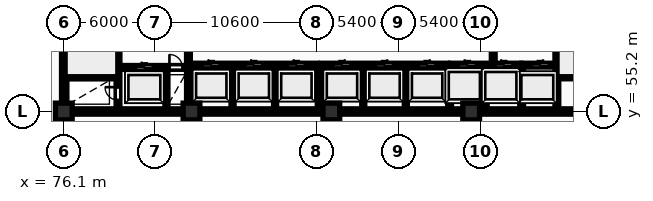
"""IFC4 building model, lengths in metres.
Left out: names, types, materials, properties, quantities, classifications, styles, units other than length and angle.
Written with IfcOpenShell. Run it as: python <this file> out.ifc"""

import sys

from ifc_helpers import new_model, si_unit, direction, frame, frame_2d, origin, origin_2d, place, context, subcontext, project, spatial, rectangle, extrude, element, fill, save


model = new_model("IFC4")
c1 = context("Model", 3, precision=1e-05, world=origin(), true_north=direction((0.0, 1.0)))
c2 = subcontext(c1, "Body", "Model", "MODEL_VIEW")
j1 = project(units=[si_unit("LENGTHUNIT", "METRE"), si_unit("PLANEANGLEUNIT", "RADIAN")], contexts=[c1])
p1 = place(None, origin())
s1 = spatial("IfcSite", under=j1, at=p1, CompositionType="ELEMENT")
p2 = place(p1, origin())
s2 = spatial("IfcBuilding", under=s1, at=p2, CompositionType="ELEMENT")
p3 = place(p2, origin())
s3 = spatial("IfcBuildingStorey", under=s2, at=p3, CompositionType="ELEMENT", Elevation=0.0)
for number, where, z_axis, x_axis in (
    (1, (76.1, 55.2, 0.0), (0.0, 0.0, 1.0), (1.0, 0.0, 0.0)),
    (2, (84.5, 55.2, 0.0), (0.0, 0.0, 1.0), (1.0, 0.0, 0.0)),
    (3, (93.7, 55.2, 0.0), (0.0, 0.0, 1.0), (1.0, 0.0, 0.0)),
    (4, (102.9, 55.2, 0.0), (0.0, 0.0, 1.0), (1.0, 0.0, 0.0)),
):
    element("IfcColumn", number, at=place(p3, frame(where, z_axis=z_axis, x_axis=x_axis)), inside=s3, PredefinedType="COLUMN", context=c2, shape_type="SweptSolid", body=[
        extrude(rectangle(XDim=1.1, YDim=1.1, at=origin_2d()), origin(), (0.0, 0.0, 1.0), 5.4),
    ])
p4 = place(p3, frame((75.95, 55.2, 0.0), z_axis=(0.0, 0.0, 1.0), x_axis=(1.0, 0.0, 0.0)))
e5 = element("IfcWall", 5, at=p4, inside=s3, PredefinedType="SHEAR", context=c2, shape_type="SweptSolid", body=[
    extrude(rectangle(XDim=36.3, YDim=0.35, at=frame_2d((18.15, 0.0))), origin(), (0.0, 0.0, 1.0), 5.4),
])
p5 = place(p3, frame((76.125, 55.375, 0.0), z_axis=(0.0, 0.0, 1.0), x_axis=(0.0, 1.0, 0.0)))
e6 = element("IfcWall", 6, at=p5, inside=s3, PredefinedType="SHEAR", context=c2, shape_type="SweptSolid", body=[
    extrude(rectangle(XDim=11.65, YDim=0.35, at=frame_2d((5.825, 0.0))), origin(), (0.0, 0.0, 1.0), 5.4),
])
p6 = place(p3, frame((79.665, 55.4, 0.0), z_axis=(0.0, 0.0, 1.0), x_axis=(0.0, 1.0, 0.0)))
e7 = element("IfcWall", 7, at=p6, inside=s3, PredefinedType="SHEAR", context=c2, shape_type="SweptSolid", body=[
    extrude(rectangle(XDim=11.6, YDim=0.25, at=frame_2d((5.8, 0.0))), origin(), (0.0, 0.0, 1.0), 5.4),
])
p7 = place(p6, frame((0.55, 0.0, 0.0)))
e8 = element("IfcOpeningElement", 8, at=p7, cuts=e7, PredefinedType="OPENING", context=c2, shape_type="SweptSolid", body=[
    extrude(rectangle(XDim=0.85, YDim=2.05, at=frame_2d((0.425, 1.025))), frame((0.0, 0.135, 0.0), z_axis=(0.0, -1.0, 0.0), x_axis=(1.0, 0.0, 0.0)), (0.0, 0.0, 1.0), 0.27),
])
p8 = place(p6, frame((8.4, 0.0, 0.0)))
e9 = element("IfcOpeningElement", 9, at=p8, cuts=e7, PredefinedType="OPENING", context=c2, shape_type="SweptSolid", body=[
    extrude(rectangle(XDim=1.1, YDim=2.1, at=frame_2d((0.55, 1.05))), frame((0.0, 0.135, 0.0), z_axis=(0.0, -1.0, 0.0), x_axis=(1.0, 0.0, 0.0)), (0.0, 0.0, 1.0), 0.27),
])
p9 = place(p6, frame((10.25, 0.0, 0.0)))
e10 = element("IfcOpeningElement", 10, at=p9, cuts=e7, PredefinedType="OPENING", context=c2, shape_type="SweptSolid", body=[
    extrude(rectangle(XDim=0.85, YDim=2.05, at=frame_2d((0.425, 1.025))), frame((0.0, 0.135, 0.0), z_axis=(0.0, -1.0, 0.0), x_axis=(1.0, 0.0, 0.0)), (0.0, 0.0, 1.0), 0.27),
])
p10 = place(p3, frame((76.3, 57.475, 0.0), z_axis=(0.0, 0.0, 1.0), x_axis=(1.0, 0.0, 0.0)))
e11 = element("IfcWall", 11, at=p10, inside=s3, PredefinedType="SHEAR", context=c2, shape_type="SweptSolid", body=[
    extrude(rectangle(XDim=3.24, YDim=0.25, at=frame_2d((1.62, 0.0))), origin(), (0.0, 0.0, 1.0), 5.4),
])
p11 = place(p3, frame((79.79, 58.1, 0.0), z_axis=(0.0, 0.0, 1.0), x_axis=(1.0, 0.0, 0.0)))
e12 = element("IfcWall", 12, at=p11, inside=s3, PredefinedType="SHEAR", context=c2, shape_type="SweptSolid", body=[
    extrude(rectangle(XDim=4.39, YDim=0.25, at=frame_2d((2.195, 0.0))), origin(), (0.0, 0.0, 1.0), 5.4),
])
p12 = place(p11, frame((1.05, 0.0, 0.0)))
e13 = element("IfcOpeningElement", 13, at=p12, cuts=e12, PredefinedType="OPENING", context=c2, shape_type="SweptSolid", body=[
    extrude(rectangle(XDim=1.12, YDim=2.12, at=frame_2d((0.56, 1.06))), frame((0.0, 0.135, 0.0), z_axis=(0.0, -1.0, 0.0), x_axis=(1.0, 0.0, 0.0)), (0.0, 0.0, 1.0), 0.27),
])
p13 = place(p11, frame((3.26, 0.0, 0.0)))
e14 = element("IfcOpeningElement", 14, at=p13, cuts=e12, PredefinedType="OPENING", context=c2, shape_type="SweptSolid", body=[
    extrude(rectangle(XDim=0.85, YDim=2.05, at=frame_2d((0.425, 1.025))), frame((0.0, 0.135, 0.0), z_axis=(0.0, -1.0, 0.0), x_axis=(1.0, 0.0, 0.0)), (0.0, 0.0, 1.0), 0.27),
])
p14 = place(p3, frame((82.85, 55.4, 0.0), z_axis=(0.0, 0.0, 1.0), x_axis=(0.0, 1.0, 0.0)))
e15 = element("IfcWall", 15, at=p14, inside=s3, PredefinedType="PARTITIONING", context=c2, shape_type="SweptSolid", body=[
    extrude(rectangle(XDim=2.56, YDim=0.2, at=frame_2d((1.28, 0.0))), origin(), (0.0, 0.0, 1.0), 5.1),
])
p15 = place(p3, frame((84.3, 55.4, 0.0), z_axis=(0.0, 0.0, 1.0), x_axis=(0.0, 1.0, 0.0)))
e16 = element("IfcWall", 16, at=p15, inside=s3, PredefinedType="SHEAR", context=c2, shape_type="SweptSolid", body=[
    extrude(rectangle(XDim=11.6, YDim=0.25, at=frame_2d((5.8, 0.0))), origin(), (0.0, 0.0, 1.0), 5.4),
])
p16 = place(p15, frame((5.2, 0.0, 0.0)))
e17 = element("IfcOpeningElement", 17, at=p16, cuts=e16, PredefinedType="OPENING", context=c2, shape_type="SweptSolid", body=[
    extrude(rectangle(XDim=1.1, YDim=2.1, at=frame_2d((0.55, 1.05))), frame((0.0, 0.135, 0.0), z_axis=(0.0, -1.0, 0.0), x_axis=(1.0, 0.0, 0.0)), (0.0, 0.0, 1.0), 0.27),
])
for number, where, z_axis, x_axis in (
    (18, (87.2, 55.4, 0.0), (0.0, 0.0, 1.0), (0.0, 1.0, 0.0)),
    (19, (90.0, 55.4, 0.0), (0.0, 0.0, 1.0), (0.0, 1.0, 0.0)),
):
    element("IfcWall", number, at=place(p3, frame(where, z_axis=z_axis, x_axis=x_axis)), inside=s3, PredefinedType="PARTITIONING", context=c2, shape_type="SweptSolid", body=[
        extrude(rectangle(XDim=2.72, YDim=0.2, at=frame_2d((1.36, 0.0))), origin(), (0.0, 0.0, 1.0), 5.1),
    ])
p17 = place(p3, frame((84.42, 58.25, 0.0), z_axis=(0.0, 0.0, 1.0), x_axis=(1.0, 0.0, 0.0)))
e20 = element("IfcWall", 20, at=p17, inside=s3, PredefinedType="SHEAR", context=c2, shape_type="SweptSolid", body=[
    extrude(rectangle(XDim=8.36, YDim=0.25, at=frame_2d((4.18, 0.0))), origin(), (0.0, 0.0, 1.0), 5.4),
])
p18 = place(p17, frame((0.82, 0.0, 0.0)))
e21 = element("IfcOpeningElement", 21, at=p18, cuts=e20, PredefinedType="OPENING", context=c2, shape_type="SweptSolid", body=[
    extrude(rectangle(XDim=1.12, YDim=2.12, at=frame_2d((0.56, 1.06))), frame((0.0, 0.135, 0.0), z_axis=(0.0, -1.0, 0.0), x_axis=(1.0, 0.0, 0.0)), (0.0, 0.0, 1.0), 0.27),
])
p19 = place(p17, frame((3.62, 0.0, 0.0)))
e22 = element("IfcOpeningElement", 22, at=p19, cuts=e20, PredefinedType="OPENING", context=c2, shape_type="SweptSolid", body=[
    extrude(rectangle(XDim=1.12, YDim=2.12, at=frame_2d((0.56, 1.06))), frame((0.0, 0.135, 0.0), z_axis=(0.0, -1.0, 0.0), x_axis=(1.0, 0.0, 0.0)), (0.0, 0.0, 1.0), 0.27),
])
p20 = place(p17, frame((6.42, 0.0, 0.0)))
e23 = element("IfcOpeningElement", 23, at=p20, cuts=e20, PredefinedType="OPENING", context=c2, shape_type="SweptSolid", body=[
    extrude(rectangle(XDim=1.12, YDim=2.12, at=frame_2d((0.56, 1.06))), frame((0.0, 0.135, 0.0), z_axis=(0.0, -1.0, 0.0), x_axis=(1.0, 0.0, 0.0)), (0.0, 0.0, 1.0), 0.27),
])
p21 = place(p3, frame((92.9, 55.4, 0.0), z_axis=(0.0, 0.0, 1.0), x_axis=(0.0, 1.0, 0.0)))
e24 = element("IfcWall", 24, at=p21, inside=s3, PredefinedType="SHEAR", context=c2, shape_type="SweptSolid", body=[
    extrude(rectangle(XDim=2.85, YDim=0.25, at=frame_2d((1.425, 0.0))), origin(), (0.0, 0.0, 1.0), 5.4),
])
for number, where, z_axis, x_axis in (
    (25, (95.8, 55.4, 0.0), (0.0, 0.0, 1.0), (0.0, 1.0, 0.0)),
    (26, (98.6, 55.4, 0.0), (0.0, 0.0, 1.0), (0.0, 1.0, 0.0)),
):
    element("IfcWall", number, at=place(p3, frame(where, z_axis=z_axis, x_axis=x_axis)), inside=s3, PredefinedType="PARTITIONING", context=c2, shape_type="SweptSolid", body=[
        extrude(rectangle(XDim=2.72, YDim=0.2, at=frame_2d((1.36, 0.0))), origin(), (0.0, 0.0, 1.0), 5.1),
    ])
p22 = place(p3, frame((93.02, 58.25, 0.0), z_axis=(0.0, 0.0, 1.0), x_axis=(1.0, 0.0, 0.0)))
e27 = element("IfcWall", 27, at=p22, inside=s3, PredefinedType="SHEAR", context=c2, shape_type="SweptSolid", body=[
    extrude(rectangle(XDim=8.36, YDim=0.25, at=frame_2d((4.18, 0.0))), origin(), (0.0, 0.0, 1.0), 5.4),
])
p23 = place(p22, frame((0.82, 0.0, 0.0)))
e28 = element("IfcOpeningElement", 28, at=p23, cuts=e27, PredefinedType="OPENING", context=c2, shape_type="SweptSolid", body=[
    extrude(rectangle(XDim=1.12, YDim=2.12, at=frame_2d((0.56, 1.06))), frame((0.0, 0.135, 0.0), z_axis=(0.0, -1.0, 0.0), x_axis=(1.0, 0.0, 0.0)), (0.0, 0.0, 1.0), 0.27),
])
p24 = place(p22, frame((3.62, 0.0, 0.0)))
e29 = element("IfcOpeningElement", 29, at=p24, cuts=e27, PredefinedType="OPENING", context=c2, shape_type="SweptSolid", body=[
    extrude(rectangle(XDim=1.12, YDim=2.12, at=frame_2d((0.56, 1.06))), frame((0.0, 0.135, 0.0), z_axis=(0.0, -1.0, 0.0), x_axis=(1.0, 0.0, 0.0)), (0.0, 0.0, 1.0), 0.27),
])
p25 = place(p22, frame((6.42, 0.0, 0.0)))
e30 = element("IfcOpeningElement", 30, at=p25, cuts=e27, PredefinedType="OPENING", context=c2, shape_type="SweptSolid", body=[
    extrude(rectangle(XDim=1.12, YDim=2.12, at=frame_2d((0.56, 1.06))), frame((0.0, 0.135, 0.0), z_axis=(0.0, -1.0, 0.0), x_axis=(1.0, 0.0, 0.0)), (0.0, 0.0, 1.0), 0.27),
])
p26 = place(p3, frame((101.48, 55.4, 0.0), z_axis=(0.0, 0.0, 1.0), x_axis=(0.0, 1.0, 0.0)))
e31 = element("IfcWall", 31, at=p26, inside=s3, PredefinedType="SHEAR", context=c2, shape_type="SweptSolid", body=[
    extrude(rectangle(XDim=2.85, YDim=0.25, at=frame_2d((1.425, 0.0))), origin(), (0.0, 0.0, 1.0), 5.4),
])
p27 = place(p3, frame((103.85, 55.4, 0.0), z_axis=(0.0, 0.0, 1.0), x_axis=(0.0, 1.0, 0.0)))
e32 = element("IfcWall", 32, at=p27, inside=s3, PredefinedType="PARTITIONING", context=c2, shape_type="SweptSolid", body=[
    extrude(rectangle(XDim=2.72, YDim=0.2, at=frame_2d((1.36, 0.0))), origin(), (0.0, 0.0, 1.0), 5.1),
])
p28 = place(p3, frame((101.55, 58.25, 0.0), z_axis=(0.0, 0.0, 1.0), x_axis=(1.0, 0.0, 0.0)))
e33 = element("IfcWall", 33, at=p28, inside=s3, PredefinedType="SHEAR", context=c2, shape_type="SweptSolid", body=[
    extrude(rectangle(XDim=4.6, YDim=0.25, at=frame_2d((2.3, 0.0))), origin(), (0.0, 0.0, 1.0), 5.4),
])
p29 = place(p28, frame((0.54, 0.0, 0.0)))
e34 = element("IfcOpeningElement", 34, at=p29, cuts=e33, PredefinedType="OPENING", context=c2, shape_type="SweptSolid", body=[
    extrude(rectangle(XDim=1.12, YDim=2.12, at=frame_2d((0.56, 1.06))), frame((0.0, 0.135, 0.0), z_axis=(0.0, -1.0, 0.0), x_axis=(1.0, 0.0, 0.0)), (0.0, 0.0, 1.0), 0.27),
])
p30 = place(p28, frame((2.94, 0.0, 0.0)))
e35 = element("IfcOpeningElement", 35, at=p30, cuts=e33, PredefinedType="OPENING", context=c2, shape_type="SweptSolid", body=[
    extrude(rectangle(XDim=1.12, YDim=2.12, at=frame_2d((0.56, 1.06))), frame((0.0, 0.135, 0.0), z_axis=(0.0, -1.0, 0.0), x_axis=(1.0, 0.0, 0.0)), (0.0, 0.0, 1.0), 0.27),
])
p31 = place(p3, frame((106.22, 55.4, 0.0), z_axis=(0.0, 0.0, 1.0), x_axis=(0.0, 1.0, 0.0)))
e36 = element("IfcWall", 36, at=p31, inside=s3, PredefinedType="SHEAR", context=c2, shape_type="SweptSolid", body=[
    extrude(rectangle(XDim=2.85, YDim=0.25, at=frame_2d((1.425, 0.0))), origin(), (0.0, 0.0, 1.0), 5.4),
])
p32 = place(p3, frame((106.22, 58.25, 0.0), z_axis=(0.0, 0.0, 1.0), x_axis=(1.0, 0.0, 0.0)))
e37 = element("IfcWall", 37, at=p32, inside=s3, PredefinedType="SHEAR", context=c2, shape_type="SweptSolid", body=[
    extrude(rectangle(XDim=2.46, YDim=0.25, at=frame_2d((1.23, 0.0))), origin(), (0.0, 0.0, 1.0), 5.4),
])
p33 = place(p32, frame((0.67, 0.0, 0.0)))
e38 = element("IfcOpeningElement", 38, at=p33, cuts=e37, PredefinedType="OPENING", context=c2, shape_type="SweptSolid", body=[
    extrude(rectangle(XDim=1.12, YDim=2.12, at=frame_2d((0.56, 1.06))), frame((0.0, 0.135, 0.0), z_axis=(0.0, -1.0, 0.0), x_axis=(1.0, 0.0, 0.0)), (0.0, 0.0, 1.0), 0.27),
])
p34 = place(p3, frame((104.35, 58.4, 0.0), z_axis=(0.0, 0.0, 1.0), x_axis=(0.0, 1.0, 0.0)))
e39 = element("IfcWall", 39, at=p34, inside=s3, PredefinedType="SHEAR", context=c2, shape_type="SweptSolid", body=[
    extrude(rectangle(XDim=8.6, YDim=0.25, at=frame_2d((4.3, 0.0))), origin(), (0.0, 0.0, 1.0), 5.4),
])
p35 = place(p34, frame((1.8, 0.0, 0.0)))
e40 = element("IfcOpeningElement", 40, at=p35, cuts=e39, PredefinedType="OPENING", context=c2, shape_type="SweptSolid", body=[
    extrude(rectangle(XDim=1.1, YDim=2.1, at=frame_2d((0.55, 1.05))), frame((0.0, 0.135, 0.0), z_axis=(0.0, -1.0, 0.0), x_axis=(1.0, 0.0, 0.0)), (0.0, 0.0, 1.0), 0.27),
])
p36 = place(p3, frame((108.535, 55.4, 0.0), z_axis=(0.0, 0.0, 1.0), x_axis=(0.0, 1.0, 0.0)))
e41 = element("IfcWall", 41, at=p36, inside=s3, PredefinedType="SHEAR", context=c2, shape_type="SweptSolid", body=[
    extrude(rectangle(XDim=11.6, YDim=0.25, at=frame_2d((5.8, 0.0))), origin(), (0.0, 0.0, 1.0), 5.4),
])
p37 = place(p36, frame((8.2, 0.0, 0.0)))
e42 = element("IfcOpeningElement", 42, at=p37, cuts=e41, PredefinedType="OPENING", context=c2, shape_type="SweptSolid", body=[
    extrude(rectangle(XDim=1.1, YDim=2.1, at=frame_2d((0.55, 1.05))), frame((0.0, 0.135, 0.0), z_axis=(0.0, -1.0, 0.0), x_axis=(1.0, 0.0, 0.0)), (0.0, 0.0, 1.0), 0.27),
])
p38 = place(p36, frame((10.25, 0.0, 0.0)))
e43 = element("IfcOpeningElement", 43, at=p38, cuts=e41, PredefinedType="OPENING", context=c2, shape_type="SweptSolid", body=[
    extrude(rectangle(XDim=0.85, YDim=2.05, at=frame_2d((0.425, 1.025))), frame((0.0, 0.135, 0.0), z_axis=(0.0, -1.0, 0.0), x_axis=(1.0, 0.0, 0.0)), (0.0, 0.0, 1.0), 0.27),
])
p39 = place(p3, frame((108.66, 57.475, 0.0), z_axis=(0.0, 0.0, 1.0), x_axis=(1.0, 0.0, 0.0)))
e44 = element("IfcWall", 44, at=p39, inside=s3, PredefinedType="SHEAR", context=c2, shape_type="SweptSolid", body=[
    extrude(rectangle(XDim=3.24, YDim=0.25, at=frame_2d((1.62, 0.0))), origin(), (0.0, 0.0, 1.0), 5.4),
])
p40 = place(p7, origin())
e45 = element("IfcDoor", 45, at=p40, inside=s3, OperationType="SINGLE_SWING_RIGHT", PredefinedType="DOOR", context=c2, shape_type="SweptSolid", body=[
    extrude(rectangle(XDim=0.85, YDim=2.05, at=frame_2d((0.425, 1.025))), frame((0.0, 0.025, 0.0), z_axis=(0.0, -1.0, 0.0), x_axis=(1.0, 0.0, 0.0)), (0.0, 0.0, 1.0), 0.05),
])
fill(e8, e45)
p41 = place(p12, origin())
e46 = element("IfcDoor", 46, at=p41, inside=s3, OperationType="SLIDING_TO_LEFT", PredefinedType="DOOR", context=c2, shape_type="SweptSolid", body=[
    extrude(rectangle(XDim=1.12, YDim=2.12, at=frame_2d((0.56, 1.06))), frame((0.0, 0.025, 0.0), z_axis=(0.0, -1.0, 0.0), x_axis=(1.0, 0.0, 0.0)), (0.0, 0.0, 1.0), 0.05),
])
fill(e13, e46)
p42 = place(p13, origin())
e47 = element("IfcDoor", 47, at=p42, inside=s3, OperationType="SINGLE_SWING_LEFT", PredefinedType="DOOR", context=c2, shape_type="SweptSolid", body=[
    extrude(rectangle(XDim=0.85, YDim=2.05, at=frame_2d((0.425, 1.025))), frame((0.0, 0.025, 0.0), z_axis=(0.0, -1.0, 0.0), x_axis=(1.0, 0.0, 0.0)), (0.0, 0.0, 1.0), 0.05),
])
fill(e14, e47)
p43 = place(p18, origin())
e48 = element("IfcDoor", 48, at=p43, inside=s3, OperationType="SLIDING_TO_LEFT", PredefinedType="DOOR", context=c2, shape_type="SweptSolid", body=[
    extrude(rectangle(XDim=1.12, YDim=2.12, at=frame_2d((0.56, 1.06))), frame((0.0, 0.025, 0.0), z_axis=(0.0, -1.0, 0.0), x_axis=(1.0, 0.0, 0.0)), (0.0, 0.0, 1.0), 0.05),
])
fill(e21, e48)
p44 = place(p19, origin())
e49 = element("IfcDoor", 49, at=p44, inside=s3, OperationType="SLIDING_TO_LEFT", PredefinedType="DOOR", context=c2, shape_type="SweptSolid", body=[
    extrude(rectangle(XDim=1.12, YDim=2.12, at=frame_2d((0.56, 1.06))), frame((0.0, 0.025, 0.0), z_axis=(0.0, -1.0, 0.0), x_axis=(1.0, 0.0, 0.0)), (0.0, 0.0, 1.0), 0.05),
])
fill(e22, e49)
p45 = place(p20, origin())
e50 = element("IfcDoor", 50, at=p45, inside=s3, OperationType="SLIDING_TO_LEFT", PredefinedType="DOOR", context=c2, shape_type="SweptSolid", body=[
    extrude(rectangle(XDim=1.12, YDim=2.12, at=frame_2d((0.56, 1.06))), frame((0.0, 0.025, 0.0), z_axis=(0.0, -1.0, 0.0), x_axis=(1.0, 0.0, 0.0)), (0.0, 0.0, 1.0), 0.05),
])
fill(e23, e50)
p46 = place(p23, origin())
e51 = element("IfcDoor", 51, at=p46, inside=s3, OperationType="SLIDING_TO_RIGHT", PredefinedType="DOOR", context=c2, shape_type="SweptSolid", body=[
    extrude(rectangle(XDim=1.12, YDim=2.12, at=frame_2d((0.56, 1.06))), frame((0.0, 0.025, 0.0), z_axis=(0.0, -1.0, 0.0), x_axis=(1.0, 0.0, 0.0)), (0.0, 0.0, 1.0), 0.05),
])
fill(e28, e51)
p47 = place(p24, origin())
e52 = element("IfcDoor", 52, at=p47, inside=s3, OperationType="SLIDING_TO_RIGHT", PredefinedType="DOOR", context=c2, shape_type="SweptSolid", body=[
    extrude(rectangle(XDim=1.12, YDim=2.12, at=frame_2d((0.56, 1.06))), frame((0.0, 0.025, 0.0), z_axis=(0.0, -1.0, 0.0), x_axis=(1.0, 0.0, 0.0)), (0.0, 0.0, 1.0), 0.05),
])
fill(e29, e52)
p48 = place(p25, origin())
e53 = element("IfcDoor", 53, at=p48, inside=s3, OperationType="SLIDING_TO_RIGHT", PredefinedType="DOOR", context=c2, shape_type="SweptSolid", body=[
    extrude(rectangle(XDim=1.12, YDim=2.12, at=frame_2d((0.56, 1.06))), frame((0.0, 0.025, 0.0), z_axis=(0.0, -1.0, 0.0), x_axis=(1.0, 0.0, 0.0)), (0.0, 0.0, 1.0), 0.05),
])
fill(e30, e53)
p49 = place(p29, origin())
e54 = element("IfcDoor", 54, at=p49, inside=s3, OperationType="SLIDING_TO_LEFT", PredefinedType="DOOR", context=c2, shape_type="SweptSolid", body=[
    extrude(rectangle(XDim=1.12, YDim=2.12, at=frame_2d((0.56, 1.06))), frame((0.0, 0.025, 0.0), z_axis=(0.0, -1.0, 0.0), x_axis=(1.0, 0.0, 0.0)), (0.0, 0.0, 1.0), 0.05),
])
fill(e34, e54)
p50 = place(p30, origin())
e55 = element("IfcDoor", 55, at=p50, inside=s3, OperationType="SLIDING_TO_LEFT", PredefinedType="DOOR", context=c2, shape_type="SweptSolid", body=[
    extrude(rectangle(XDim=1.12, YDim=2.12, at=frame_2d((0.56, 1.06))), frame((0.0, 0.025, 0.0), z_axis=(0.0, -1.0, 0.0), x_axis=(1.0, 0.0, 0.0)), (0.0, 0.0, 1.0), 0.05),
])
fill(e35, e55)
p51 = place(p33, origin())
e56 = element("IfcDoor", 56, at=p51, inside=s3, OperationType="SLIDING_TO_RIGHT", PredefinedType="DOOR", context=c2, shape_type="SweptSolid", body=[
    extrude(rectangle(XDim=1.12, YDim=2.12, at=frame_2d((0.56, 1.06))), frame((0.0, 0.025, 0.0), z_axis=(0.0, -1.0, 0.0), x_axis=(1.0, 0.0, 0.0)), (0.0, 0.0, 1.0), 0.05),
])
fill(e38, e56)
save(model, sys.argv[1])
